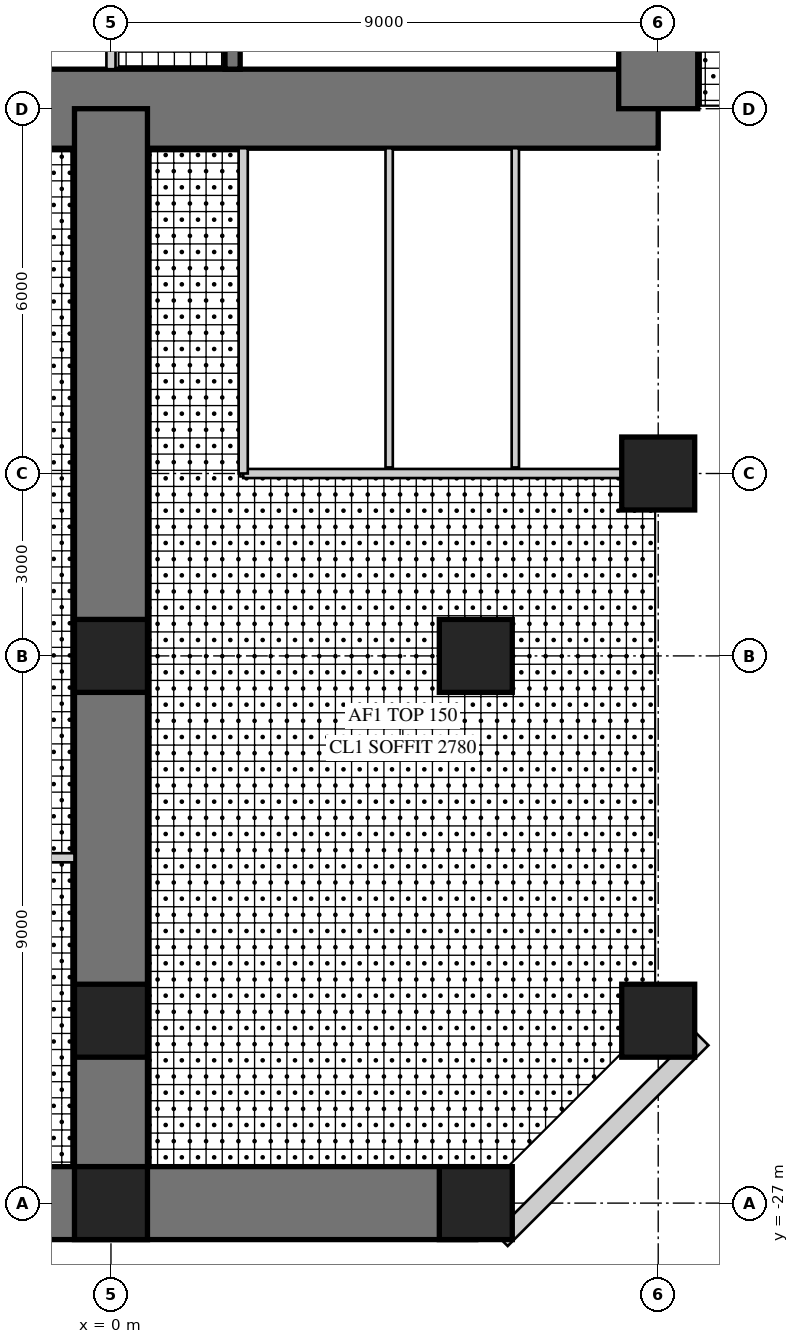
"""IFC4 building model, lengths in metres.
Left out: names, types, materials, properties, quantities, classifications, styles, units other than length and angle.
Written with IfcOpenShell. Run it as: python <this file> out.ifc"""

import sys

from ifc_helpers import new_model, si_unit, direction, frame, frame_2d, origin, origin_2d, place, context, subcontext, project, spatial, rectangle, hollow_rectangle, extrude, element, fill, save


model = new_model("IFC4")
c1 = context("Model", 3, precision=1e-05, world=origin(), true_north=direction((0.0, 1.0)))
c2 = subcontext(c1, "Body", "Model", "MODEL_VIEW")
j1 = project(units=[si_unit("LENGTHUNIT", "METRE"), si_unit("PLANEANGLEUNIT", "RADIAN")], contexts=[c1])
p1 = place(None, origin())
s1 = spatial("IfcSite", under=j1, at=p1, CompositionType="ELEMENT")
p2 = place(p1, origin())
s2 = spatial("IfcBuilding", under=s1, at=p2, CompositionType="ELEMENT")
p3 = place(p2, frame((0.0, 0.0, 59.5)))
s3 = spatial("IfcBuildingStorey", under=s2, at=p3, CompositionType="ELEMENT", Elevation=59.5)
p4 = place(p3, frame((-9.0, -9.0, 0.0), z_axis=(0.0, 0.0, 1.0), x_axis=(1.0, 0.0, 0.0)))
e1 = element("IfcWall", 1, at=p4, inside=s3, PredefinedType="SHEAR", context=c2, shape_type="SweptSolid", body=[
    extrude(rectangle(XDim=18.0, YDim=1.3, at=frame_2d((9.0, 0.0))), origin(), (0.0, 0.0, 1.0), 4.0),
])
p5 = place(p4, frame((9.8, 0.0, 0.0)))
e2 = element("IfcOpeningElement", 2, at=p5, cuts=e1, PredefinedType="OPENING", context=c2, shape_type="SweptSolid", body=[
    extrude(rectangle(XDim=1.0, YDim=2.4, at=frame_2d((0.5, 1.2))), frame((0.0, 0.66, 0.0), z_axis=(0.0, -1.0, 0.0), x_axis=(1.0, 0.0, 0.0)), (0.0, 0.0, 1.0), 1.32),
])
p6 = place(p3, frame((9.0, -9.0, 0.0), z_axis=(0.0, 0.0, 1.0), x_axis=(0.0, 1.0, 0.0)))
e3 = element("IfcWall", 3, at=p6, inside=s3, PredefinedType="SHEAR", context=c2, shape_type="SweptSolid", body=[
    extrude(rectangle(XDim=18.0, YDim=1.3, at=frame_2d((9.0, 0.0))), origin(), (0.0, 0.0, 1.0), 4.0),
])
p7 = place(p6, frame((9.8, 0.0, 0.0)))
e4 = element("IfcOpeningElement", 4, at=p7, cuts=e3, PredefinedType="OPENING", context=c2, shape_type="SweptSolid", body=[
    extrude(rectangle(XDim=1.0, YDim=2.4, at=frame_2d((0.5, 1.2))), frame((0.0, 0.66, 0.0), z_axis=(0.0, -1.0, 0.0), x_axis=(1.0, 0.0, 0.0)), (0.0, 0.0, 1.0), 1.32),
])
p8 = place(p3, frame((2.0, -1.675, 0.0), z_axis=(0.0, 0.0, 1.0), x_axis=(0.0, -1.0, 0.0)))
e5 = element("IfcWall", 5, at=p8, inside=s3, PredefinedType="SHEAR", context=c2, shape_type="SweptSolid", body=[
    extrude(rectangle(XDim=6.675, YDim=0.25, at=frame_2d((3.337, 0.0))), origin(), (0.0, 0.0, 1.0), 4.0),
])
p9 = place(p8, frame((0.725, 0.0, 0.0)))
e6 = element("IfcOpeningElement", 6, at=p9, cuts=e5, PredefinedType="OPENING", context=c2, shape_type="SweptSolid", body=[
    extrude(rectangle(XDim=1.0, YDim=2.1, at=frame_2d((0.5, 1.05))), frame((0.0, 0.135, 0.0), z_axis=(0.0, -1.0, 0.0), x_axis=(1.0, 0.0, 0.0)), (0.0, 0.0, 1.0), 0.27),
])
p10 = place(p3, frame((0.0, -9.0, 0.0), z_axis=(0.0, 0.0, 1.0), x_axis=(0.0, -1.0, 0.0)))
e7 = element("IfcWall", 7, at=p10, inside=s3, PredefinedType="SHEAR", context=c2, shape_type="SweptSolid", body=[
    extrude(rectangle(XDim=18.0, YDim=1.2, at=frame_2d((9.0, 0.0))), origin(), (0.0, 0.0, 1.0), 4.0),
])
p11 = place(p10, frame((9.9, 0.0, 0.0)))
e8 = element("IfcOpeningElement", 8, at=p11, cuts=e7, PredefinedType="OPENING", context=c2, shape_type="SweptSolid", body=[
    extrude(rectangle(XDim=1.0, YDim=2.2, at=frame_2d((0.5, 1.1))), frame((0.0, 0.61, 0.0), z_axis=(0.0, -1.0, 0.0), x_axis=(1.0, 0.0, 0.0)), (0.0, 0.0, 1.0), 1.22),
])
p12 = place(p3, frame((-6.0, -27.0, 0.0), z_axis=(0.0, 0.0, 1.0), x_axis=(1.0, 0.0, 0.0)))
e9 = element("IfcWall", 9, at=p12, inside=s3, PredefinedType="SHEAR", context=c2, shape_type="SweptSolid", body=[
    extrude(rectangle(XDim=12.0, YDim=1.2, at=frame_2d((6.0, 0.0))), origin(), (0.0, 0.0, 1.0), 4.0),
])
p13 = place(p12, frame((1.6, 0.0, 0.6)))
e10 = element("IfcOpeningElement", 10, at=p13, cuts=e9, PredefinedType="OPENING", context=c2, shape_type="SweptSolid", body=[
    extrude(rectangle(XDim=3.0, YDim=2.4, at=frame_2d((1.5, 1.2))), frame((0.0, 0.61, 0.0), z_axis=(0.0, -1.0, 0.0), x_axis=(1.0, 0.0, 0.0)), (0.0, 0.0, 1.0), 1.22),
])
p14 = place(p12, frame((7.4, 0.0, 0.6)))
e11 = element("IfcOpeningElement", 11, at=p14, cuts=e9, PredefinedType="OPENING", context=c2, shape_type="SweptSolid", body=[
    extrude(rectangle(XDim=3.0, YDim=2.4, at=frame_2d((1.5, 1.2))), frame((0.0, 0.61, 0.0), z_axis=(0.0, -1.0, 0.0), x_axis=(1.0, 0.0, 0.0)), (0.0, 0.0, 1.0), 1.22),
])
for number, where, z_axis, x_axis in (
    (12, (9.0, -15.0, 0.0), (0.0, 0.0, 1.0), (1.0, 0.0, 0.0)),
    (13, (9.0, -24.0, 0.0), (0.0, 0.0, 1.0), (1.0, 0.0, 0.0)),
    (14, (0.0, -27.0, 0.0), (0.0, 0.0, 1.0), (1.0, 0.0, 0.0)),
    (15, (6.0, -27.0, 0.0), (0.0, 0.0, 1.0), (1.0, 0.0, 0.0)),
    (16, (0.0, -18.0, 0.0), (0.0, 0.0, 1.0), (1.0, 0.0, 0.0)),
    (17, (6.0, -18.0, 0.0), (0.0, 0.0, 1.0), (1.0, 0.0, 0.0)),
    (18, (0.0, -24.0, 0.0), (0.0, 0.0, 1.0), (1.0, 0.0, 0.0)),
):
    element("IfcColumn", number, at=place(p3, frame(where, z_axis=z_axis, x_axis=x_axis)), inside=s3, PredefinedType="COLUMN", context=c2, shape_type="SweptSolid", body=[
        extrude(rectangle(XDim=1.2, YDim=1.2, at=origin_2d()), origin(), (0.0, 0.0, 1.0), 4.0),
    ])
p15 = place(p3, frame((6.418, -27.6, 0.0), z_axis=(0.0, 0.0, 1.0), x_axis=(0.707106781187, 0.707106781187, 0.0)))
e19 = element("IfcWall", 19, at=p15, inside=s3, PredefinedType="SOLIDWALL", context=c2, shape_type="SweptSolid", body=[
    extrude(rectangle(XDim=4.669, YDim=0.3, at=frame_2d((2.335, 0.0))), origin(), (0.0, 0.0, 1.0), 3.8),
])
p16 = place(p15, frame((1.885, 0.0, 0.3)))
e20 = element("IfcOpeningElement", 20, at=p16, cuts=e19, PredefinedType="OPENING", context=c2, shape_type="SweptSolid", body=[
    extrude(rectangle(XDim=0.9, YDim=2.4, at=frame_2d((0.45, 1.2))), frame((0.0, 0.16, 0.0), z_axis=(0.0, -1.0, 0.0), x_axis=(1.0, 0.0, 0.0)), (0.0, 0.0, 1.0), 0.32),
])
p17 = place(p3, frame((0.0, -5.675, 0.0), z_axis=(0.0, 0.0, 1.0), x_axis=(0.0, -1.0, 0.0)))
e21 = element("IfcWall", 21, at=p17, inside=s3, PredefinedType="PARTITIONING", context=c2, shape_type="SweptSolid", body=[
    extrude(rectangle(XDim=2.675, YDim=0.15, at=frame_2d((1.337, 0.0))), origin(), (0.0, 0.0, 1.0), 3.8),
])
p18 = place(p17, frame((0.4, 0.0, 0.0)))
e22 = element("IfcOpeningElement", 22, at=p18, cuts=e21, PredefinedType="OPENING", context=c2, shape_type="SweptSolid", body=[
    extrude(rectangle(XDim=1.0, YDim=2.1, at=frame_2d((0.5, 1.05))), frame((0.0, 0.085, 0.0), z_axis=(0.0, -1.0, 0.0), x_axis=(1.0, 0.0, 0.0)), (0.0, 0.0, 1.0), 0.17),
])
p19 = place(p3, frame((2.175, -15.0, 0.0), z_axis=(0.0, 0.0, 1.0), x_axis=(1.0, 0.0, 0.0)))
e23 = element("IfcWall", 23, at=p19, inside=s3, PredefinedType="PARTITIONING", context=c2, shape_type="SweptSolid", body=[
    extrude(rectangle(XDim=6.225, YDim=0.15, at=frame_2d((3.112, 0.0))), origin(), (0.0, 0.0, 1.0), 2.95),
])
p20 = place(p19, frame((0.7, 0.0, 0.0)))
e24 = element("IfcOpeningElement", 24, at=p20, cuts=e23, PredefinedType="OPENING", context=c2, shape_type="SweptSolid", body=[
    extrude(rectangle(XDim=1.0, YDim=2.1, at=frame_2d((0.5, 1.05))), frame((0.0, 0.085, 0.0), z_axis=(0.0, -1.0, 0.0), x_axis=(1.0, 0.0, 0.0)), (0.0, 0.0, 1.0), 0.17),
])
p21 = place(p19, frame((2.938, 0.0, 0.0)))
e25 = element("IfcOpeningElement", 25, at=p21, cuts=e23, PredefinedType="OPENING", context=c2, shape_type="SweptSolid", body=[
    extrude(rectangle(XDim=1.0, YDim=2.1, at=frame_2d((0.5, 1.05))), frame((0.0, 0.085, 0.0), z_axis=(0.0, -1.0, 0.0), x_axis=(1.0, 0.0, 0.0)), (0.0, 0.0, 1.0), 0.17),
])
p22 = place(p19, frame((4.85, 0.0, 0.0)))
e26 = element("IfcOpeningElement", 26, at=p22, cuts=e23, PredefinedType="OPENING", context=c2, shape_type="SweptSolid", body=[
    extrude(rectangle(XDim=1.0, YDim=2.1, at=frame_2d((0.5, 1.05))), frame((0.0, 0.085, 0.0), z_axis=(0.0, -1.0, 0.0), x_axis=(1.0, 0.0, 0.0)), (0.0, 0.0, 1.0), 0.17),
])
p23 = place(p3, frame((2.175, -9.65, 0.0), z_axis=(0.0, 0.0, 1.0), x_axis=(0.0, -1.0, 0.0)))
e27 = element("IfcWall", 27, at=p23, inside=s3, PredefinedType="PARTITIONING", context=c2, shape_type="SweptSolid", body=[
    extrude(rectangle(XDim=5.35, YDim=0.15, at=frame_2d((2.675, 0.0))), origin(), (0.0, 0.0, 1.0), 3.8),
])
for number, where, z_axis, x_axis in (
    (28, (4.575, -9.65, 0.0), (0.0, 0.0, 1.0), (0.0, -1.0, 0.0)),
    (29, (6.65, -9.65, 0.0), (0.0, 0.0, 1.0), (0.0, -1.0, 0.0)),
):
    element("IfcWall", number, at=place(p3, frame(where, z_axis=z_axis, x_axis=x_axis)), inside=s3, PredefinedType="PLUMBINGWALL", context=c2, shape_type="SweptSolid", body=[
        extrude(rectangle(XDim=5.25, YDim=0.12, at=frame_2d((2.625, 0.0))), origin(), (0.0, 0.0, 1.0), 3.8),
    ])
p24 = place(p3, frame((-9.68, -21.32, 0.0), z_axis=(0.0, 0.0, 1.0), x_axis=(1.0, 0.0, 0.0)))
e30 = element("IfcWall", 30, at=p24, inside=s3, PredefinedType="PARTITIONING", context=c2, shape_type="SweptSolid", body=[
    extrude(rectangle(XDim=9.08, YDim=0.15, at=frame_2d((4.54, 0.0))), origin(), (0.0, 0.0, 1.0), 3.8),
])
p25 = place(p24, frame((7.63, 0.0, 0.0)))
e31 = element("IfcOpeningElement", 31, at=p25, cuts=e30, PredefinedType="OPENING", context=c2, shape_type="SweptSolid", body=[
    extrude(rectangle(XDim=1.0, YDim=2.2, at=frame_2d((0.5, 1.1))), frame((0.0, 0.085, 0.0), z_axis=(0.0, -1.0, 0.0), x_axis=(1.0, 0.0, 0.0)), (0.0, 0.0, 1.0), 0.17),
])
p26 = place(p14, origin())
e32 = element("IfcWindow", 32, at=p26, inside=s3, PartitioningType="SINGLE_PANEL", PredefinedType="WINDOW", context=c2, shape_type="SweptSolid", body=[
    extrude(hollow_rectangle(XDim=3.0, YDim=2.4, WallThickness=0.06, at=frame_2d((1.5, 1.2))), frame((0.0, 0.03, 0.0), z_axis=(0.0, -1.0, 0.0), x_axis=(1.0, 0.0, 0.0)), (0.0, 0.0, 1.0), 0.06),
    extrude(rectangle(XDim=2.879, YDim=2.279, at=frame_2d((1.5, 1.2))), frame((0.0, 0.03, 0.0), z_axis=(0.0, -1.0, 0.0), x_axis=(1.0, 0.0, 0.0)), (0.0, 0.0, 1.0), 0.06),
])
fill(e11, e32)
p27 = place(p16, origin())
e33 = element("IfcWindow", 33, at=p27, inside=s3, PartitioningType="SINGLE_PANEL", PredefinedType="WINDOW", context=c2, shape_type="SweptSolid", body=[
    extrude(hollow_rectangle(XDim=0.9, YDim=2.4, WallThickness=0.06, at=frame_2d((0.45, 1.2))), frame((0.0, 0.03, 0.0), z_axis=(0.0, -1.0, 0.0), x_axis=(1.0, 0.0, 0.0)), (0.0, 0.0, 1.0), 0.06),
    extrude(rectangle(XDim=0.779, YDim=2.279, at=frame_2d((0.45, 1.2))), frame((0.0, 0.03, 0.0), z_axis=(0.0, -1.0, 0.0), x_axis=(1.0, 0.0, 0.0)), (0.0, 0.0, 1.0), 0.06),
])
fill(e20, e33)
p28 = place(p20, origin())
e34 = element("IfcDoor", 34, at=p28, inside=s3, OperationType="SINGLE_SWING_LEFT", PredefinedType="DOOR", context=c2, shape_type="SweptSolid", body=[
    extrude(rectangle(XDim=1.0, YDim=2.1, at=frame_2d((0.5, 1.05))), frame((0.0, 0.025, 0.0), z_axis=(0.0, -1.0, 0.0), x_axis=(1.0, 0.0, 0.0)), (0.0, 0.0, 1.0), 0.05),
])
fill(e24, e34)
p29 = place(p21, origin())
e35 = element("IfcDoor", 35, at=p29, inside=s3, OperationType="SINGLE_SWING_RIGHT", PredefinedType="DOOR", context=c2, shape_type="SweptSolid", body=[
    extrude(rectangle(XDim=1.0, YDim=2.1, at=frame_2d((0.5, 1.05))), frame((0.0, 0.025, 0.0), z_axis=(0.0, -1.0, 0.0), x_axis=(1.0, 0.0, 0.0)), (0.0, 0.0, 1.0), 0.05),
])
fill(e25, e35)
p30 = place(p22, origin())
e36 = element("IfcDoor", 36, at=p30, inside=s3, OperationType="SINGLE_SWING_LEFT", PredefinedType="DOOR", context=c2, shape_type="SweptSolid", body=[
    extrude(rectangle(XDim=1.0, YDim=2.1, at=frame_2d((0.5, 1.05))), frame((0.0, 0.025, 0.0), z_axis=(0.0, -1.0, 0.0), x_axis=(1.0, 0.0, 0.0)), (0.0, 0.0, 1.0), 0.05),
])
fill(e26, e36)
p31 = place(p11, frame((1.0, 0.0, 0.0), z_axis=(0.0, 0.0, 1.0), x_axis=(-1.0, 0.0, 0.0)))
e37 = element("IfcDoor", 37, at=p31, inside=s3, OperationType="SINGLE_SWING_LEFT", PredefinedType="DOOR", context=c2, shape_type="SweptSolid", body=[
    extrude(rectangle(XDim=1.0, YDim=2.2, at=frame_2d((0.5, 1.1))), frame((0.0, 0.025, 0.0), z_axis=(0.0, -1.0, 0.0), x_axis=(1.0, 0.0, 0.0)), (0.0, 0.0, 1.0), 0.05),
])
fill(e8, e37)
p32 = place(p5, frame((1.0, 0.0, 0.0), z_axis=(0.0, 0.0, 1.0), x_axis=(-1.0, 0.0, 0.0)))
e38 = element("IfcDoor", 38, at=p32, inside=s3, OperationType="SINGLE_SWING_RIGHT", PredefinedType="DOOR", context=c2, shape_type="SweptSolid", body=[
    extrude(rectangle(XDim=1.0, YDim=2.4, at=frame_2d((0.5, 1.2))), frame((0.0, -0.005, 0.0), z_axis=(0.0, -1.0, 0.0), x_axis=(1.0, 0.0, 0.0)), (0.0, 0.0, 1.0), 0.05),
])
fill(e2, e38)
save(model, sys.argv[1])
